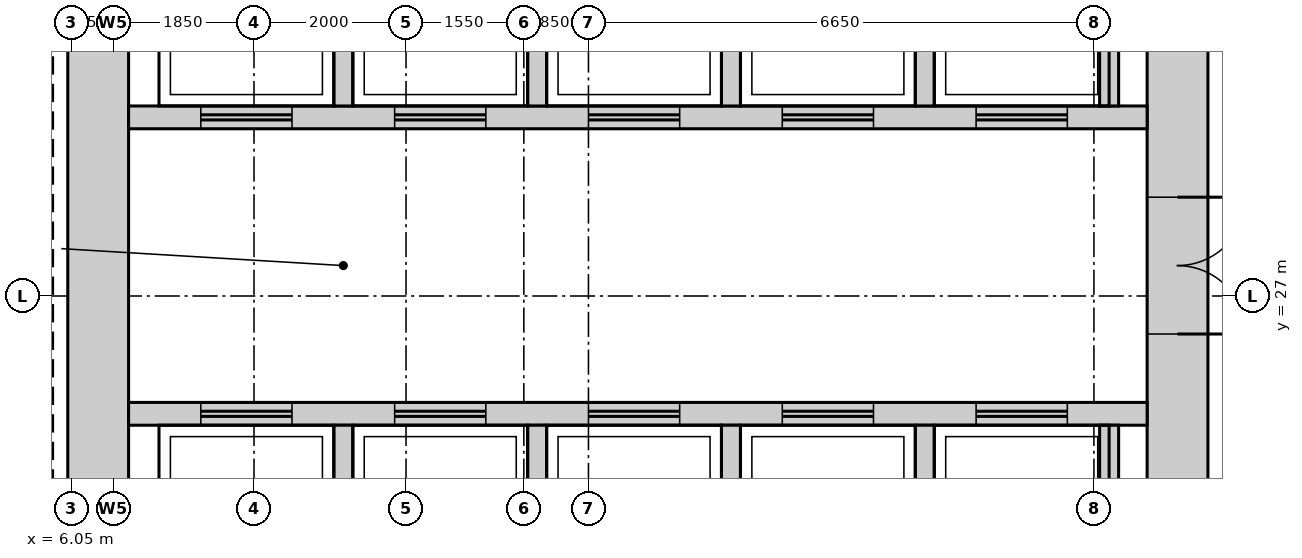
"""IFC4 building model, lengths in metres.
Left out: names, types, materials, properties, quantities, classifications, styles, units other than length and angle.
Written with IfcOpenShell. Run it as: python <this file> out.ifc"""

import sys

from ifc_helpers import new_model, si_unit, direction, frame, frame_2d, origin, place, context, subcontext, project, spatial, rectangle, extrude, source, transform, mapped, element, fill, save


model = new_model("IFC4")
c1 = context("Model", 3, precision=1e-05, world=origin(), true_north=direction((0.0, 1.0)))
c2 = subcontext(c1, "Body", "Model", "MODEL_VIEW")
j1 = project(units=[si_unit("LENGTHUNIT", "METRE"), si_unit("PLANEANGLEUNIT", "RADIAN")], contexts=[c1])
p1 = place(None, origin())
s1 = spatial("IfcSite", under=j1, at=p1, CompositionType="ELEMENT")
p2 = place(p1, origin())
s2 = spatial("IfcBuilding", under=s1, at=p2, CompositionType="ELEMENT")
p3 = place(p2, frame((0.0, 0.0, 192.7)))
s3 = spatial("IfcBuildingStorey", under=s2, at=p3, CompositionType="ELEMENT", Elevation=192.7)
m1 = source(origin(), c2, "Body", "SweptSolid", [
    extrude(rectangle(XDim=22.4, YDim=0.8, at=frame_2d((11.2, 0.0))), origin(), (0.0, 0.0, 1.0), 3.75),
])
p4 = place(p3, frame((20.6, 15.8, 0.0), z_axis=(0.0, 0.0, 1.0), x_axis=(0.0, 1.0, 0.0)))
e1 = element("IfcWall", 1, at=p4, inside=s3, PredefinedType="SHEAR", context=c2, shape_type="MappedRepresentation", body=[
    mapped(m1, transform((0.0, 0.0, 0.0))),
])
m2 = source(origin(), c2, "Body", "SweptSolid", [
    extrude(rectangle(XDim=1.8, YDim=2.1, at=frame_2d((0.9, 1.05))), frame((0.0, 0.41, 0.0), z_axis=(0.0, -1.0, 0.0), x_axis=(1.0, 0.0, 0.0)), (0.0, 0.0, 1.0), 0.82),
])
p5 = place(p4, frame((10.7, 0.0, 0.0)))
e2 = element("IfcOpeningElement", 2, at=p5, cuts=e1, PredefinedType="OPENING", context=c2, shape_type="MappedRepresentation", body=[
    mapped(m2, transform((0.0, 0.0, 0.0))),
])
m3 = source(origin(), c2, "Body", "SweptSolid", [
    extrude(rectangle(XDim=0.9, YDim=2.1, at=frame_2d((0.45, 1.05))), frame((0.0, 0.41, 0.0), z_axis=(0.0, -1.0, 0.0), x_axis=(1.0, 0.0, 0.0)), (0.0, 0.0, 1.0), 0.82),
])
p6 = place(p4, frame((0.35, 0.0, 0.0)))
e3 = element("IfcOpeningElement", 3, at=p6, cuts=e1, PredefinedType="OPENING", context=c2, shape_type="MappedRepresentation", body=[
    mapped(m3, transform((0.0, 0.0, 0.0))),
])
p7 = place(p4, frame((2.15, 0.0, 0.0)))
e4 = element("IfcOpeningElement", 4, at=p7, cuts=e1, PredefinedType="OPENING", context=c2, shape_type="MappedRepresentation", body=[
    mapped(m3, transform((0.0, 0.0, 0.0))),
])
m4 = source(origin(), c2, "Body", "SweptSolid", [
    extrude(rectangle(XDim=1.0, YDim=2.1, at=frame_2d((0.5, 1.05))), frame((0.0, 0.41, 0.0), z_axis=(0.0, -1.0, 0.0), x_axis=(1.0, 0.0, 0.0)), (0.0, 0.0, 1.0), 0.82),
])
p8 = place(p4, frame((4.85, 0.0, 0.0)))
e5 = element("IfcOpeningElement", 5, at=p8, cuts=e1, PredefinedType="OPENING", context=c2, shape_type="MappedRepresentation", body=[
    mapped(m4, transform((0.0, 0.0, 0.0))),
])
p9 = place(p3, frame((6.4, 15.8, 0.0), z_axis=(0.0, 0.0, 1.0), x_axis=(0.0, 1.0, 0.0)))
e6 = element("IfcWall", 6, at=p9, inside=s3, PredefinedType="SHEAR", context=c2, shape_type="MappedRepresentation", body=[
    mapped(m1, transform((0.0, 0.0, 0.0))),
])
m5 = source(origin(), c2, "Body", "SweptSolid", [
    extrude(rectangle(XDim=13.4, YDim=0.3, at=frame_2d((6.7, 0.0))), origin(), (0.0, 0.0, 1.0), 3.75),
])
p10 = place(p3, frame((6.8, 29.35, 0.0), z_axis=(0.0, 0.0, 1.0), x_axis=(1.0, 0.0, 0.0)))
e7 = element("IfcWall", 7, at=p10, inside=s3, PredefinedType="STANDARD", context=c2, shape_type="MappedRepresentation", body=[
    mapped(m5, transform((0.0, 0.0, 0.0))),
])
m6 = source(origin(), c2, "Body", "SweptSolid", [
    extrude(rectangle(XDim=1.2, YDim=2.1, at=frame_2d((0.6, 1.05))), frame((0.0, 0.16, 0.0), z_axis=(0.0, -1.0, 0.0), x_axis=(1.0, 0.0, 0.0)), (0.0, 0.0, 1.0), 0.32),
])
p11 = place(p10, frame((0.95, 0.0, 0.0)))
e8 = element("IfcOpeningElement", 8, at=p11, cuts=e7, PredefinedType="OPENING", context=c2, shape_type="MappedRepresentation", body=[
    mapped(m6, transform((0.0, 0.0, 0.0))),
])
p12 = place(p10, frame((3.5, 0.0, 0.0)))
e9 = element("IfcOpeningElement", 9, at=p12, cuts=e7, PredefinedType="OPENING", context=c2, shape_type="MappedRepresentation", body=[
    mapped(m6, transform((0.0, 0.0, 0.0))),
])
p13 = place(p10, frame((6.05, 0.0, 0.0)))
e10 = element("IfcOpeningElement", 10, at=p13, cuts=e7, PredefinedType="OPENING", context=c2, shape_type="MappedRepresentation", body=[
    mapped(m6, transform((0.0, 0.0, 0.0))),
])
p14 = place(p10, frame((8.6, 0.0, 0.0)))
e11 = element("IfcOpeningElement", 11, at=p14, cuts=e7, PredefinedType="OPENING", context=c2, shape_type="MappedRepresentation", body=[
    mapped(m6, transform((0.0, 0.0, 0.0))),
])
p15 = place(p10, frame((11.15, 0.0, 0.0)))
e12 = element("IfcOpeningElement", 12, at=p15, cuts=e7, PredefinedType="OPENING", context=c2, shape_type="MappedRepresentation", body=[
    mapped(m6, transform((0.0, 0.0, 0.0))),
])
p16 = place(p3, frame((6.8, 25.45, 0.0), z_axis=(0.0, 0.0, 1.0), x_axis=(1.0, 0.0, 0.0)))
e13 = element("IfcWall", 13, at=p16, inside=s3, PredefinedType="STANDARD", context=c2, shape_type="MappedRepresentation", body=[
    mapped(m5, transform((0.0, 0.0, 0.0))),
])
p17 = place(p16, frame((0.95, 0.0, 0.0)))
e14 = element("IfcOpeningElement", 14, at=p17, cuts=e13, PredefinedType="OPENING", context=c2, shape_type="MappedRepresentation", body=[
    mapped(m6, transform((0.0, 0.0, 0.0))),
])
p18 = place(p16, frame((3.5, 0.0, 0.0)))
e15 = element("IfcOpeningElement", 15, at=p18, cuts=e13, PredefinedType="OPENING", context=c2, shape_type="MappedRepresentation", body=[
    mapped(m6, transform((0.0, 0.0, 0.0))),
])
p19 = place(p16, frame((6.05, 0.0, 0.0)))
e16 = element("IfcOpeningElement", 16, at=p19, cuts=e13, PredefinedType="OPENING", context=c2, shape_type="MappedRepresentation", body=[
    mapped(m6, transform((0.0, 0.0, 0.0))),
])
p20 = place(p16, frame((8.6, 0.0, 0.0)))
e17 = element("IfcOpeningElement", 17, at=p20, cuts=e13, PredefinedType="OPENING", context=c2, shape_type="MappedRepresentation", body=[
    mapped(m6, transform((0.0, 0.0, 0.0))),
])
p21 = place(p16, frame((11.15, 0.0, 0.0)))
e18 = element("IfcOpeningElement", 18, at=p21, cuts=e13, PredefinedType="OPENING", context=c2, shape_type="MappedRepresentation", body=[
    mapped(m6, transform((0.0, 0.0, 0.0))),
])
m7 = source(origin(), c2, "Body", "SweptSolid", [
    extrude(rectangle(XDim=2.4, YDim=0.25, at=frame_2d((1.2, 0.0))), origin(), (0.0, 0.0, 1.0), 3.75),
])
for number, where, z_axis, x_axis in (
    (19, (17.275, 29.5, 0.0), (0.0, 0.0, 1.0), (0.0, 1.0, 0.0)),
    (20, (19.7, 29.5, 0.0), (0.0, 0.0, 1.0), (0.0, 1.0, 0.0)),
    (21, (9.625, 29.5, 0.0), (0.0, 0.0, 1.0), (0.0, 1.0, 0.0)),
    (22, (12.175, 29.5, 0.0), (0.0, 0.0, 1.0), (0.0, 1.0, 0.0)),
    (23, (14.725, 29.5, 0.0), (0.0, 0.0, 1.0), (0.0, 1.0, 0.0)),
):
    element("IfcWall", number, at=place(p3, frame(where, z_axis=z_axis, x_axis=x_axis)), inside=s3, PredefinedType="STANDARD", context=c2, shape_type="MappedRepresentation", body=[
        mapped(m7, transform((0.0, 0.0, 0.0))),
    ])
m8 = source(origin(), c2, "Body", "SweptSolid", [
    extrude(rectangle(XDim=2.4, YDim=0.25, at=frame_2d((1.2, 0.0))), origin(), (0.0, 0.0, 1.0), 3.75),
])
for number, where, z_axis, x_axis in (
    (24, (17.275, 22.9, 0.0), (0.0, 0.0, 1.0), (0.0, 1.0, 0.0)),
    (25, (19.7, 22.9, 0.0), (0.0, 0.0, 1.0), (0.0, 1.0, 0.0)),
    (26, (9.625, 22.9, 0.0), (0.0, 0.0, 1.0), (0.0, 1.0, 0.0)),
    (27, (12.175, 22.9, 0.0), (0.0, 0.0, 1.0), (0.0, 1.0, 0.0)),
    (28, (14.725, 22.9, 0.0), (0.0, 0.0, 1.0), (0.0, 1.0, 0.0)),
):
    element("IfcWall", number, at=place(p3, frame(where, z_axis=z_axis, x_axis=x_axis)), inside=s3, PredefinedType="STANDARD", context=c2, shape_type="MappedRepresentation", body=[
        mapped(m8, transform((0.0, 0.0, 0.0))),
    ])
m9 = source(origin(), c2, "Body", "SweptSolid", [
    extrude(rectangle(XDim=1.8, YDim=2.1, at=frame_2d((0.9, 1.05))), frame((0.0, 0.35, 0.0), z_axis=(0.0, -1.0, 0.0), x_axis=(1.0, 0.0, 0.0)), (0.0, 0.0, 1.0), 0.7),
])
p22 = place(p5, origin())
e29 = element("IfcDoor", 29, at=p22, inside=s3, OperationType="DOUBLE_DOOR_SINGLE_SWING", PredefinedType="DOOR", context=c2, shape_type="MappedRepresentation", body=[
    mapped(m9, transform((0.0, 0.0, 0.0))),
])
fill(e2, e29)
m10 = source(origin(), c2, "Body", "SweptSolid", [
    extrude(rectangle(XDim=1.2, YDim=2.1, at=frame_2d((0.6, 1.05))), frame((0.0, 0.025, 0.0), z_axis=(0.0, -1.0, 0.0), x_axis=(1.0, 0.0, 0.0)), (0.0, 0.0, 1.0), 0.05),
])
p23 = place(p17, origin())
e30 = element("IfcDoor", 30, at=p23, inside=s3, OperationType="DOUBLE_DOOR_SLIDING", PredefinedType="DOOR", context=c2, shape_type="MappedRepresentation", body=[
    mapped(m10, transform((0.0, 0.0, 0.0))),
])
fill(e14, e30)
p24 = place(p18, origin())
e31 = element("IfcDoor", 31, at=p24, inside=s3, OperationType="DOUBLE_DOOR_SLIDING", PredefinedType="DOOR", context=c2, shape_type="MappedRepresentation", body=[
    mapped(m10, transform((0.0, 0.0, 0.0))),
])
fill(e15, e31)
p25 = place(p19, origin())
e32 = element("IfcDoor", 32, at=p25, inside=s3, OperationType="DOUBLE_DOOR_SLIDING", PredefinedType="DOOR", context=c2, shape_type="MappedRepresentation", body=[
    mapped(m10, transform((0.0, 0.0, 0.0))),
])
fill(e16, e32)
p26 = place(p20, origin())
e33 = element("IfcDoor", 33, at=p26, inside=s3, OperationType="DOUBLE_DOOR_SLIDING", PredefinedType="DOOR", context=c2, shape_type="MappedRepresentation", body=[
    mapped(m10, transform((0.0, 0.0, 0.0))),
])
fill(e17, e33)
p27 = place(p21, origin())
e34 = element("IfcDoor", 34, at=p27, inside=s3, OperationType="DOUBLE_DOOR_SLIDING", PredefinedType="DOOR", context=c2, shape_type="MappedRepresentation", body=[
    mapped(m10, transform((0.0, 0.0, 0.0))),
])
fill(e18, e34)
p28 = place(p11, origin())
e35 = element("IfcDoor", 35, at=p28, inside=s3, OperationType="DOUBLE_DOOR_SLIDING", PredefinedType="DOOR", context=c2, shape_type="MappedRepresentation", body=[
    mapped(m10, transform((0.0, 0.0, 0.0))),
])
fill(e8, e35)
p29 = place(p12, origin())
e36 = element("IfcDoor", 36, at=p29, inside=s3, OperationType="DOUBLE_DOOR_SLIDING", PredefinedType="DOOR", context=c2, shape_type="MappedRepresentation", body=[
    mapped(m10, transform((0.0, 0.0, 0.0))),
])
fill(e9, e36)
p30 = place(p13, origin())
e37 = element("IfcDoor", 37, at=p30, inside=s3, OperationType="DOUBLE_DOOR_SLIDING", PredefinedType="DOOR", context=c2, shape_type="MappedRepresentation", body=[
    mapped(m10, transform((0.0, 0.0, 0.0))),
])
fill(e10, e37)
p31 = place(p14, origin())
e38 = element("IfcDoor", 38, at=p31, inside=s3, OperationType="DOUBLE_DOOR_SLIDING", PredefinedType="DOOR", context=c2, shape_type="MappedRepresentation", body=[
    mapped(m10, transform((0.0, 0.0, 0.0))),
])
fill(e11, e38)
p32 = place(p15, origin())
e39 = element("IfcDoor", 39, at=p32, inside=s3, OperationType="DOUBLE_DOOR_SLIDING", PredefinedType="DOOR", context=c2, shape_type="MappedRepresentation", body=[
    mapped(m10, transform((0.0, 0.0, 0.0))),
])
fill(e12, e39)
save(model, sys.argv[1])
